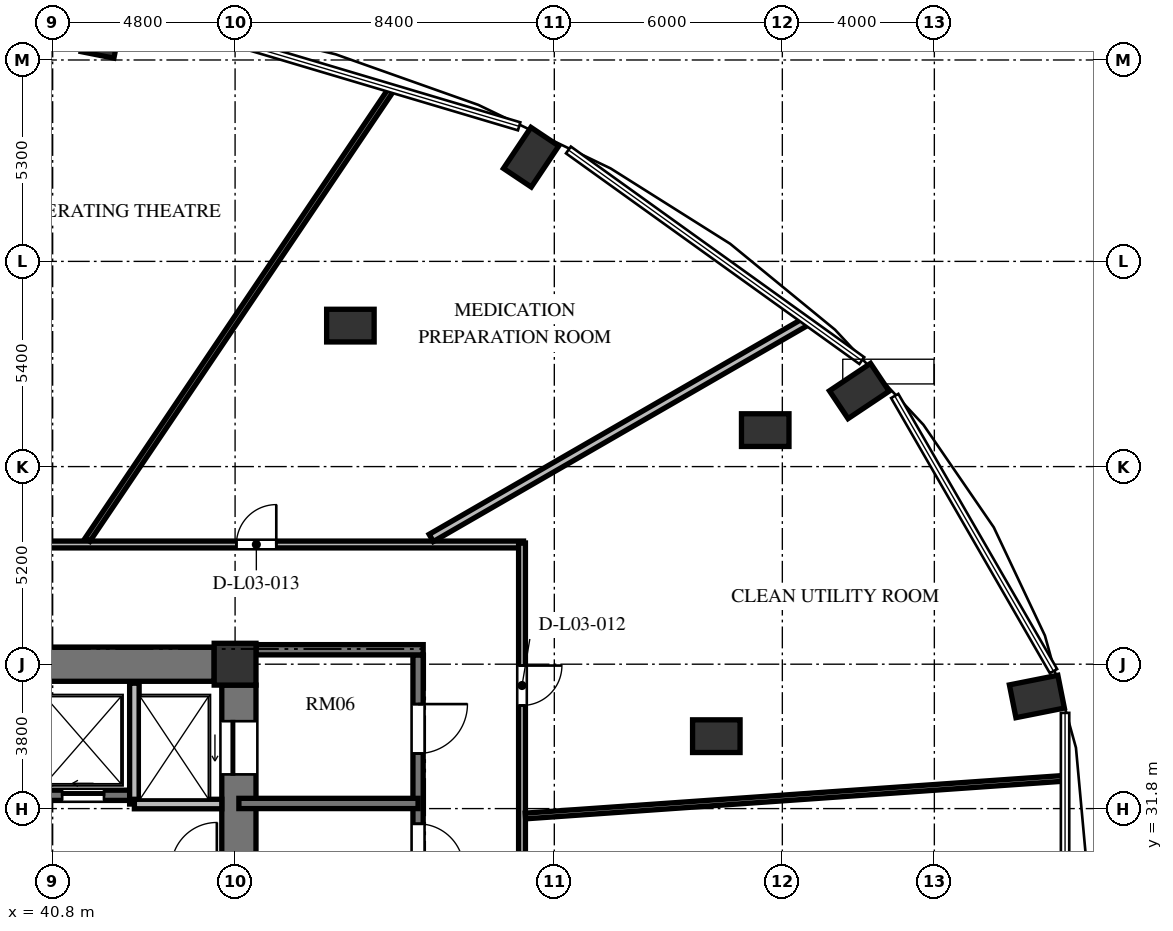
"""IFC4 building model, lengths in metres.
Left out: names, types, materials, properties, quantities, classifications, styles, units other than length and angle.
Written with IfcOpenShell. Run it as: python <this file> out.ifc"""

import sys

from ifc_helpers import new_model, si_unit, direction, frame, frame_2d, origin, origin_2d, place, context, subcontext, project, spatial, rectangle, extrude, element, fill, save


model = new_model("IFC4")
c1 = context("Model", 3, precision=1e-05, world=origin(), true_north=direction((0.0, 1.0)))
c2 = subcontext(c1, "Body", "Model", "MODEL_VIEW")
j1 = project(units=[si_unit("LENGTHUNIT", "METRE"), si_unit("PLANEANGLEUNIT", "RADIAN")], contexts=[c1])
p1 = place(None, origin())
s1 = spatial("IfcSite", under=j1, at=p1, CompositionType="ELEMENT")
p2 = place(p1, origin())
s2 = spatial("IfcBuilding", under=s1, at=p2, CompositionType="ELEMENT")
p3 = place(p2, frame((0.0, 0.0, 15.6)))
s3 = spatial("IfcBuildingStorey", under=s2, at=p3, CompositionType="ELEMENT", Elevation=15.6)
for number, where, z_axis, x_axis in (
    (1, (66.698, 34.75, 0.0), (0.0, 0.0, 1.0), (0.981, 0.195, 0.0)),
    (2, (62.025, 42.789, 0.0), (0.0, 0.0, 1.0), (0.831, 0.556, 0.0)),
    (3, (53.389, 48.942, 0.0), (0.0, 0.0, 1.0), (0.556, 0.831, 0.0)),
    (4, (42.106, 52.271, 0.0), (0.0, 0.0, 1.0), (0.195, 0.981, 0.0)),
):
    element("IfcColumn", number, at=place(p3, frame(where, z_axis=z_axis, x_axis=x_axis)), inside=s3, PredefinedType="COLUMN", context=c2, shape_type="SweptSolid", body=[
        extrude(rectangle(XDim=1.3, YDim=0.88, at=origin_2d()), origin(), (0.0, 0.0, 1.0), 4.8),
    ])
p4 = place(p3, frame((45.6, 35.6, 0.0), z_axis=(0.0, 0.0, 1.0), x_axis=(1.0, 0.0, 0.0)))
e5 = element("IfcColumn", 5, at=p4, inside=s3, PredefinedType="COLUMN", context=c2, shape_type="SweptSolid", body=[
    extrude(rectangle(XDim=1.1, YDim=1.1, at=origin_2d()), origin(), (0.0, 0.0, 1.0), 4.8),
])
for number, where, z_axis, x_axis in (
    (6, (58.263, 33.706, 0.0), (0.0, 0.0, 1.0), (1.0, 0.0, 0.0)),
    (7, (59.55, 41.76, 0.0), (0.0, 0.0, 1.0), (1.0, 0.0, 0.0)),
    (8, (48.634, 44.51, 0.0), (0.0, 0.0, 1.0), (1.0, 0.0, 0.0)),
):
    element("IfcColumn", number, at=place(p3, frame(where, z_axis=z_axis, x_axis=x_axis)), inside=s3, PredefinedType="COLUMN", context=c2, shape_type="SweptSolid", body=[
        extrude(rectangle(XDim=1.25, YDim=0.86, at=origin_2d()), origin(), (0.0, 0.0, 1.0), 4.8),
    ])
p5 = place(p3, frame((45.7, 20.95, 0.0), z_axis=(0.0, 0.0, 1.0), x_axis=(0.0, 1.0, 0.0)))
e9 = element("IfcWall", 9, at=p5, inside=s3, PredefinedType="SHEAR", context=c2, shape_type="SweptSolid", body=[
    extrude(rectangle(XDim=14.1, YDim=0.9, at=frame_2d((7.05, 0.0))), origin(), (0.0, 0.0, 1.0), 4.8),
])
p6 = place(p5, frame((11.75, 0.0, 0.0)))
e10 = element("IfcOpeningElement", 10, at=p6, cuts=e9, PredefinedType="OPENING", context=c2, shape_type="SweptSolid", body=[
    extrude(rectangle(XDim=1.4, YDim=2.3, at=frame_2d((0.7, 1.15))), frame((0.0, 0.46, 0.0), z_axis=(0.0, -1.0, 0.0), x_axis=(1.0, 0.0, 0.0)), (0.0, 0.0, 1.0), 0.92),
])
p7 = place(p5, frame((0.95, 0.0, 0.0)))
e11 = element("IfcOpeningElement", 11, at=p7, cuts=e9, PredefinedType="OPENING", context=c2, shape_type="SweptSolid", body=[
    extrude(rectangle(XDim=1.4, YDim=2.3, at=frame_2d((0.7, 1.15))), frame((0.0, 0.46, 0.0), z_axis=(0.0, -1.0, 0.0), x_axis=(1.0, 0.0, 0.0)), (0.0, 0.0, 1.0), 0.92),
])
p8 = place(p3, frame((39.75, 35.6, 0.0), z_axis=(0.0, 0.0, 1.0), x_axis=(1.0, 0.0, 0.0)))
e12 = element("IfcWall", 12, at=p8, inside=s3, PredefinedType="SHEAR", context=c2, shape_type="SweptSolid", body=[
    extrude(rectangle(XDim=5.3, YDim=0.9, at=frame_2d((2.65, 0.0))), origin(), (0.0, 0.0, 1.0), 4.8),
])
p9 = place(p3, frame((26.55, 32.15, 0.0), z_axis=(0.0, 0.0, 1.0), x_axis=(1.0, 0.0, 0.0)))
e13 = element("IfcWall", 13, at=p9, inside=s3, PredefinedType="SHEAR", context=c2, shape_type="SweptSolid", body=[
    extrude(rectangle(XDim=16.4, YDim=0.27, at=frame_2d((8.2, 0.0))), origin(), (0.0, 0.0, 1.0), 4.8),
])
p10 = place(p9, frame((1.1, 0.0, 0.0)))
e14 = element("IfcOpeningElement", 14, at=p10, cuts=e13, PredefinedType="OPENING", context=c2, shape_type="SweptSolid", body=[
    extrude(rectangle(XDim=1.1, YDim=2.2, at=frame_2d((0.55, 1.1))), frame((0.0, 0.145, 0.0), z_axis=(0.0, -1.0, 0.0), x_axis=(1.0, 0.0, 0.0)), (0.0, 0.0, 1.0), 0.29),
])
p11 = place(p9, frame((3.7, 0.0, 0.0)))
e15 = element("IfcOpeningElement", 15, at=p11, cuts=e13, PredefinedType="OPENING", context=c2, shape_type="SweptSolid", body=[
    extrude(rectangle(XDim=1.1, YDim=2.2, at=frame_2d((0.55, 1.1))), frame((0.0, 0.145, 0.0), z_axis=(0.0, -1.0, 0.0), x_axis=(1.0, 0.0, 0.0)), (0.0, 0.0, 1.0), 0.29),
])
p12 = place(p9, frame((6.5, 0.0, 0.0)))
e16 = element("IfcOpeningElement", 16, at=p12, cuts=e13, PredefinedType="OPENING", context=c2, shape_type="SweptSolid", body=[
    extrude(rectangle(XDim=1.1, YDim=2.2, at=frame_2d((0.55, 1.1))), frame((0.0, 0.145, 0.0), z_axis=(0.0, -1.0, 0.0), x_axis=(1.0, 0.0, 0.0)), (0.0, 0.0, 1.0), 0.29),
])
p13 = place(p9, frame((9.1, 0.0, 0.0)))
e17 = element("IfcOpeningElement", 17, at=p13, cuts=e13, PredefinedType="OPENING", context=c2, shape_type="SweptSolid", body=[
    extrude(rectangle(XDim=1.1, YDim=2.2, at=frame_2d((0.55, 1.1))), frame((0.0, 0.145, 0.0), z_axis=(0.0, -1.0, 0.0), x_axis=(1.0, 0.0, 0.0)), (0.0, 0.0, 1.0), 0.29),
])
p14 = place(p9, frame((11.9, 0.0, 0.0)))
e18 = element("IfcOpeningElement", 18, at=p14, cuts=e13, PredefinedType="OPENING", context=c2, shape_type="SweptSolid", body=[
    extrude(rectangle(XDim=1.1, YDim=2.2, at=frame_2d((0.55, 1.1))), frame((0.0, 0.145, 0.0), z_axis=(0.0, -1.0, 0.0), x_axis=(1.0, 0.0, 0.0)), (0.0, 0.0, 1.0), 0.29),
])
p15 = place(p9, frame((14.5, 0.0, 0.0)))
e19 = element("IfcOpeningElement", 19, at=p15, cuts=e13, PredefinedType="OPENING", context=c2, shape_type="SweptSolid", body=[
    extrude(rectangle(XDim=1.1, YDim=2.2, at=frame_2d((0.55, 1.1))), frame((0.0, 0.145, 0.0), z_axis=(0.0, -1.0, 0.0), x_axis=(1.0, 0.0, 0.0)), (0.0, 0.0, 1.0), 0.29),
])
p16 = place(p3, frame((42.95, 31.92, 0.0), z_axis=(0.0, 0.0, 1.0), x_axis=(0.0, 1.0, 0.0)))
e20 = element("IfcWall", 20, at=p16, inside=s3, PredefinedType="SOLIDWALL", context=c2, shape_type="SweptSolid", body=[
    extrude(rectangle(XDim=3.18, YDim=0.25, at=frame_2d((1.59, 0.0))), origin(), (0.0, 0.0, 1.0), 4.52),
])
p17 = place(p3, frame((42.95, 31.92, 0.0), z_axis=(0.0, 0.0, 1.0), x_axis=(1.0, 0.0, 0.0)))
e21 = element("IfcWall", 21, at=p17, inside=s3, PredefinedType="SOLIDWALL", context=c2, shape_type="SweptSolid", body=[
    extrude(rectangle(XDim=2.3, YDim=0.25, at=frame_2d((1.15, 0.0))), origin(), (0.0, 0.0, 1.0), 4.52),
])
p18 = place(p3, frame((50.415, 35.845, 0.0), z_axis=(0.0, 0.0, 1.0), x_axis=(0.0, -1.0, 0.0)))
e22 = element("IfcWall", 22, at=p18, inside=s3, PredefinedType="SHEAR", context=c2, shape_type="SweptSolid", body=[
    extrude(rectangle(XDim=15.825, YDim=0.27, at=frame_2d((7.913, 0.0))), origin(), (0.0, 0.0, 1.0), 4.8),
])
p19 = place(p18, frame((4.445, 0.0, 0.0)))
e23 = element("IfcOpeningElement", 23, at=p19, cuts=e22, PredefinedType="OPENING", context=c2, shape_type="SweptSolid", body=[
    extrude(rectangle(XDim=1.2, YDim=2.15, at=frame_2d((0.6, 1.075))), frame((0.0, 0.145, 0.0), z_axis=(0.0, -1.0, 0.0), x_axis=(1.0, 0.0, 0.0)), (0.0, 0.0, 1.0), 0.29),
])
p20 = place(p18, frame((1.295, 0.0, 0.0)))
e24 = element("IfcOpeningElement", 24, at=p20, cuts=e22, PredefinedType="OPENING", context=c2, shape_type="SweptSolid", body=[
    extrude(rectangle(XDim=1.3, YDim=2.2, at=frame_2d((0.65, 1.1))), frame((0.0, 0.145, 0.0), z_axis=(0.0, -1.0, 0.0), x_axis=(1.0, 0.0, 0.0)), (0.0, 0.0, 1.0), 0.29),
])
p21 = place(p18, frame((13.095, 0.0, 0.0)))
e25 = element("IfcOpeningElement", 25, at=p21, cuts=e22, PredefinedType="OPENING", context=c2, shape_type="SweptSolid", body=[
    extrude(rectangle(XDim=1.3, YDim=2.2, at=frame_2d((0.65, 1.1))), frame((0.0, 0.145, 0.0), z_axis=(0.0, -1.0, 0.0), x_axis=(1.0, 0.0, 0.0)), (0.0, 0.0, 1.0), 0.29),
])
p22 = place(p3, frame((46.15, 35.98, 0.0), z_axis=(0.0, 0.0, 1.0), x_axis=(1.0, 0.0, 0.0)))
e26 = element("IfcWall", 26, at=p22, inside=s3, PredefinedType="SHEAR", context=c2, shape_type="SweptSolid", body=[
    extrude(rectangle(XDim=4.4, YDim=0.27, at=frame_2d((2.2, 0.0))), origin(), (0.0, 0.0, 1.0), 4.8),
])
p23 = place(p3, frame((45.7, 31.935, 0.0), z_axis=(0.0, 0.0, 1.0), x_axis=(1.0, 0.0, 0.0)))
e27 = element("IfcWall", 27, at=p23, inside=s3, PredefinedType="SHEAR", context=c2, shape_type="SweptSolid", body=[
    extrude(rectangle(XDim=4.715, YDim=0.27, at=frame_2d((2.357, 0.0))), origin(), (0.0, 0.0, 1.0), 4.8),
])
p24 = place(p3, frame((23.31, 38.75, 0.0), z_axis=(0.0, 0.0, 1.0), x_axis=(1.0, 0.0, 0.0)))
e28 = element("IfcWall", 28, at=p24, inside=s3, PredefinedType="PARTITIONING", context=c2, shape_type="SweptSolid", body=[
    extrude(rectangle(XDim=29.88, YDim=0.18, at=frame_2d((14.94, 0.0))), origin(), (0.0, 0.0, 1.0), 4.52),
])
p25 = place(p24, frame((22.324, 0.0, 0.0)))
e29 = element("IfcOpeningElement", 29, at=p25, cuts=e28, PredefinedType="OPENING", context=c2, shape_type="SweptSolid", body=[
    extrude(rectangle(XDim=1.05, YDim=2.15, at=frame_2d((0.525, 1.075))), frame((0.0, 0.1, 0.0), z_axis=(0.0, -1.0, 0.0), x_axis=(1.0, 0.0, 0.0)), (0.0, 0.0, 1.0), 0.2),
])
p26 = place(p24, frame((11.015, 0.0, 0.0)))
e30 = element("IfcOpeningElement", 30, at=p26, cuts=e28, PredefinedType="OPENING", context=c2, shape_type="SweptSolid", body=[
    extrude(rectangle(XDim=0.95, YDim=2.1, at=frame_2d((0.475, 1.05))), frame((0.0, 0.1, 0.0), z_axis=(0.0, -1.0, 0.0), x_axis=(1.0, 0.0, 0.0)), (0.0, 0.0, 1.0), 0.2),
])
p27 = place(p3, frame((53.15, 38.79, 0.0), z_axis=(0.0, 0.0, 1.0), x_axis=(0.0, -1.0, 0.0)))
e31 = element("IfcWall", 31, at=p27, inside=s3, PredefinedType="PARTITIONING", context=c2, shape_type="SweptSolid", body=[
    extrude(rectangle(XDim=9.43, YDim=0.18, at=frame_2d((4.715, 0.0))), origin(), (0.0, 0.0, 1.0), 4.205),
])
p28 = place(p27, frame((3.226, 0.0, 0.0)))
e32 = element("IfcOpeningElement", 32, at=p28, cuts=e31, PredefinedType="OPENING", context=c2, shape_type="SweptSolid", body=[
    extrude(rectangle(XDim=1.05, YDim=2.15, at=frame_2d((0.525, 1.075))), frame((0.0, 0.1, 0.0), z_axis=(0.0, -1.0, 0.0), x_axis=(1.0, 0.0, 0.0)), (0.0, 0.0, 1.0), 0.2),
])
p29 = place(p3, frame((53.24, 31.605, 0.0), z_axis=(0.0, 0.0, 1.0), x_axis=(0.997563398333, 0.069765796107, 0.0)))
e33 = element("IfcWall", 33, at=p29, inside=s3, PredefinedType="PARTITIONING", context=c2, shape_type="SweptSolid", body=[
    extrude(rectangle(XDim=14.232, YDim=0.15, at=frame_2d((7.116, 0.0))), origin(), (0.0, 0.0, 1.0), 4.52),
])
p30 = place(p3, frame((50.761, 38.923, 0.0), z_axis=(0.0, 0.0, 1.0), x_axis=(0.866026972346, 0.499997283162, 0.0)))
e34 = element("IfcWall", 34, at=p30, inside=s3, PredefinedType="PARTITIONING", context=c2, shape_type="SweptSolid", body=[
    extrude(rectangle(XDim=11.406, YDim=0.22, at=frame_2d((5.703, 0.0))), origin(), (0.0, 0.0, 1.0), 4.52),
])
p31 = place(p3, frame((41.717, 38.875, 0.0), z_axis=(0.0, 0.0, 1.0), x_axis=(0.559191016445, 0.829038845367, 0.0)))
e35 = element("IfcWall", 35, at=p31, inside=s3, PredefinedType="PARTITIONING", context=c2, shape_type="SweptSolid", body=[
    extrude(rectangle(XDim=14.314, YDim=0.15, at=frame_2d((7.157, 0.0))), origin(), (0.0, 0.0, 1.0), 4.52),
])
p32 = place(p15, origin())
e36 = element("IfcDoor", 36, at=p32, inside=s3, OperationType="SLIDING_TO_LEFT", PredefinedType="DOOR", context=c2, shape_type="SweptSolid", body=[
    extrude(rectangle(XDim=1.1, YDim=2.2, at=frame_2d((0.55, 1.1))), frame((0.0, 0.025, 0.0), z_axis=(0.0, -1.0, 0.0), x_axis=(1.0, 0.0, 0.0)), (0.0, 0.0, 1.0), 0.05),
])
fill(e19, e36)
p33 = place(p6, origin())
e37 = element("IfcDoor", 37, at=p33, inside=s3, OperationType="SLIDING_TO_LEFT", PredefinedType="DOOR", context=c2, shape_type="SweptSolid", body=[
    extrude(rectangle(XDim=1.4, YDim=2.3, at=frame_2d((0.7, 1.15))), frame((0.0, 0.025, 0.0), z_axis=(0.0, -1.0, 0.0), x_axis=(1.0, 0.0, 0.0)), (0.0, 0.0, 1.0), 0.05),
])
fill(e10, e37)
p34 = place(p19, origin())
e38 = element("IfcDoor", 38, at=p34, inside=s3, OperationType="SINGLE_SWING_RIGHT", PredefinedType="DOOR", context=c2, shape_type="SweptSolid", body=[
    extrude(rectangle(XDim=1.2, YDim=2.15, at=frame_2d((0.6, 1.075))), frame((0.0, 0.025, 0.0), z_axis=(0.0, -1.0, 0.0), x_axis=(1.0, 0.0, 0.0)), (0.0, 0.0, 1.0), 0.05),
])
fill(e23, e38)
p35 = place(p20, origin())
e39 = element("IfcDoor", 39, at=p35, inside=s3, OperationType="SINGLE_SWING_LEFT", PredefinedType="DOOR", context=c2, shape_type="SweptSolid", body=[
    extrude(rectangle(XDim=1.3, YDim=2.2, at=frame_2d((0.65, 1.1))), frame((0.0, 0.025, 0.0), z_axis=(0.0, -1.0, 0.0), x_axis=(1.0, 0.0, 0.0)), (0.0, 0.0, 1.0), 0.05),
])
fill(e24, e39)
p36 = place(p28, origin())
e40 = element("IfcDoor", 40, at=p36, inside=s3, OperationType="SINGLE_SWING_LEFT", PredefinedType="DOOR", context=c2, shape_type="SweptSolid", body=[
    extrude(rectangle(XDim=1.05, YDim=2.15, at=frame_2d((0.525, 1.075))), frame((0.0, 0.025, 0.0), z_axis=(0.0, -1.0, 0.0), x_axis=(1.0, 0.0, 0.0)), (0.0, 0.0, 1.0), 0.05),
])
fill(e32, e40)
p37 = place(p25, origin())
e41 = element("IfcDoor", 41, at=p37, inside=s3, OperationType="SINGLE_SWING_RIGHT", PredefinedType="DOOR", context=c2, shape_type="SweptSolid", body=[
    extrude(rectangle(XDim=1.05, YDim=2.15, at=frame_2d((0.525, 1.075))), frame((0.0, 0.025, 0.0), z_axis=(0.0, -1.0, 0.0), x_axis=(1.0, 0.0, 0.0)), (0.0, 0.0, 1.0), 0.05),
])
fill(e29, e41)
save(model, sys.argv[1])
